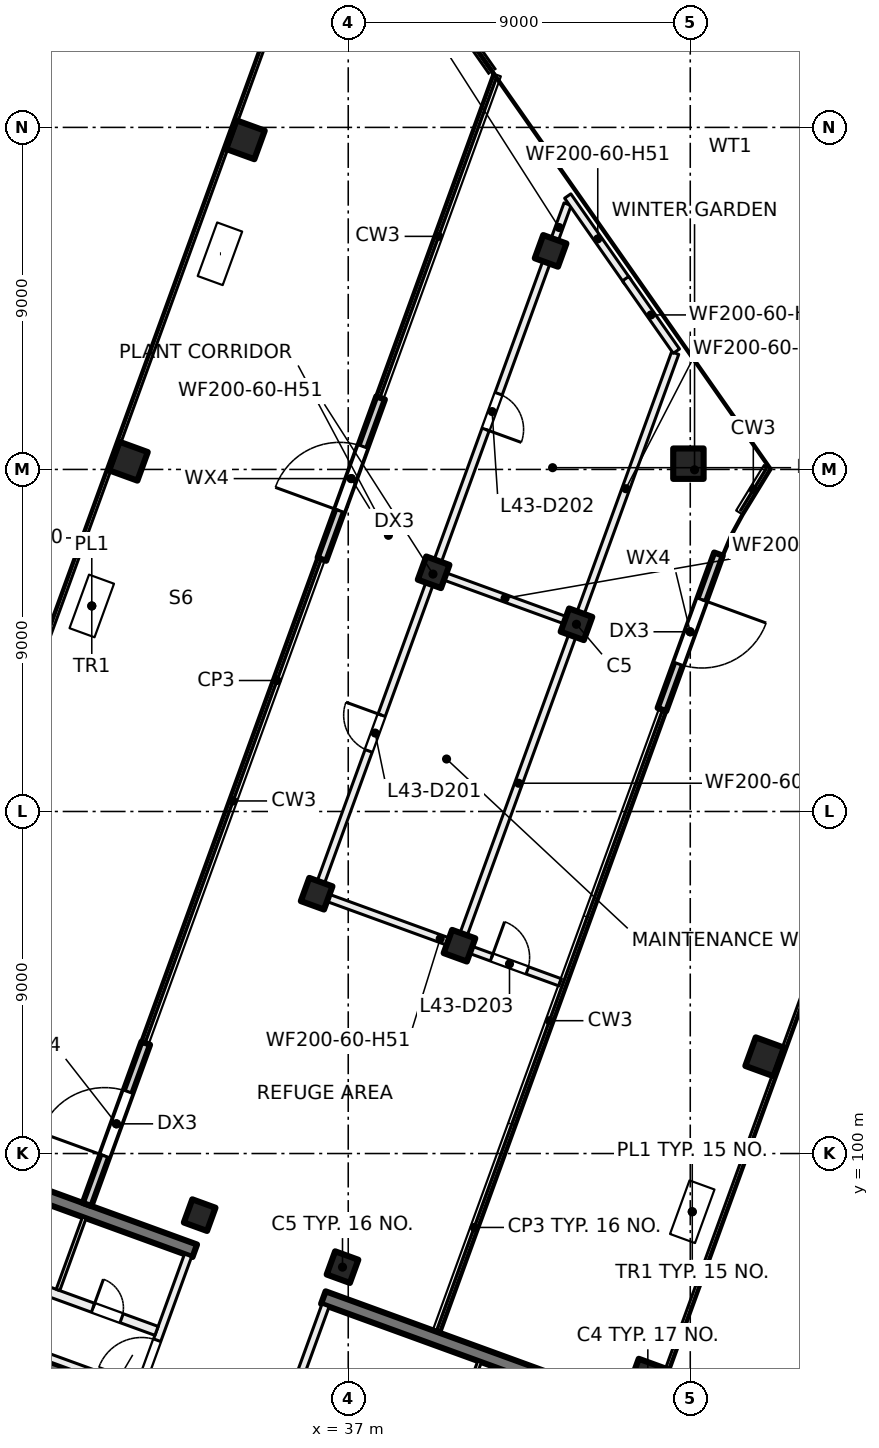
"""IFC4 building model, lengths in metres.
Left out: names, types, materials, properties, quantities, classifications, styles, units other than length and angle.
Written with IfcOpenShell. Run it as: python <this file> out.ifc"""

import sys

from ifc_helpers import new_model, si_unit, direction, frame, frame_2d, origin, origin_2d, place, context, subcontext, project, spatial, rectangle, extrude, element, fill, save


model = new_model("IFC4")
c1 = context("Model", 3, precision=1e-05, world=origin(), true_north=direction((0.0, 1.0)))
c2 = subcontext(c1, "Body", "Model", "MODEL_VIEW")
j1 = project(units=[si_unit("LENGTHUNIT", "METRE"), si_unit("PLANEANGLEUNIT", "RADIAN")], contexts=[c1])
p1 = place(None, origin())
s1 = spatial("IfcSite", under=j1, at=p1, CompositionType="ELEMENT")
p2 = place(p1, origin())
s2 = spatial("IfcBuilding", under=s1, at=p2, CompositionType="ELEMENT")
p3 = place(p2, frame((0.0, 0.0, 182.5)))
s3 = spatial("IfcBuildingStorey", under=s2, at=p3, CompositionType="ELEMENT", Elevation=182.5)
p4 = place(p3, frame((45.952, 118.152, 0.0), z_axis=(0.0, 0.0, 1.0), x_axis=(1.0, 0.0, 0.0)))
e1 = element("IfcColumn", 1, at=p4, inside=s3, PredefinedType="COLUMN", context=c2, shape_type="SweptSolid", body=[
    extrude(rectangle(XDim=0.8, YDim=0.8, at=origin_2d()), origin(), (0.0, 0.0, 1.0), 5.5),
])
for number, where, z_axis, x_axis in (
    (2, (43.006, 113.925, 0.0), (0.0, 0.0, 1.0), (-0.342, -0.94, 0.0)),
    (3, (39.927, 105.468, 0.0), (0.0, 0.0, 1.0), (-0.342, -0.94, 0.0)),
    (4, (36.849, 97.011, 0.0), (0.0, 0.0, 1.0), (-0.342, -0.94, 0.0)),
    (5, (42.325, 123.751, 0.0), (0.0, 0.0, 1.0), (-0.342, -0.94, 0.0)),
    (6, (39.247, 115.293, 0.0), (0.0, 0.0, 1.0), (-0.342, -0.94, 0.0)),
    (7, (36.169, 106.836, 0.0), (0.0, 0.0, 1.0), (-0.342, -0.94, 0.0)),
    (8, (33.091, 98.379, 0.0), (0.0, 0.0, 1.0), (-0.342, -0.94, 0.0)),
):
    element("IfcColumn", number, at=place(p3, frame(where, z_axis=z_axis, x_axis=x_axis)), inside=s3, PredefinedType="COLUMN", context=c2, shape_type="SweptSolid", body=[
        extrude(rectangle(XDim=0.65, YDim=0.65, at=origin_2d()), origin(), (0.0, 0.0, 1.0), 5.5),
    ])
for number, where, z_axis, x_axis in (
    (9, (47.962, 102.544, 0.0), (0.0, 0.0, 1.0), (-0.342, -0.94, 0.0)),
    (10, (44.884, 94.087, 0.0), (0.0, 0.0, 1.0), (-0.342, -0.94, 0.0)),
    (11, (34.291, 126.675, 0.0), (0.0, 0.0, 1.0), (-0.342, -0.94, 0.0)),
    (12, (31.212, 118.218, 0.0), (0.0, 0.0, 1.0), (-0.342, -0.94, 0.0)),
):
    element("IfcColumn", number, at=place(p3, frame(where, z_axis=z_axis, x_axis=x_axis)), inside=s3, PredefinedType="COLUMN", context=c2, shape_type="SweptSolid", body=[
        extrude(rectangle(XDim=0.8, YDim=0.8, at=origin_2d()), origin(), (0.0, 0.0, 1.0), 5.5),
    ])
p5 = place(p3, frame((31.165, 93.599, 0.0), z_axis=(0.0, 0.0, 1.0), x_axis=(-0.939683528043, 0.3420451244, 0.0)))
e13 = element("IfcWall", 13, at=p5, inside=s3, PredefinedType="SHEAR", context=c2, shape_type="SweptSolid", body=[
    extrude(rectangle(XDim=3.05, YDim=0.35, at=frame_2d((1.525, 0.0))), origin(), (0.0, 0.0, 1.0), 5.5),
])
p6 = place(p3, frame((44.473, 93.251, 0.0), z_axis=(0.0, 0.0, 1.0), x_axis=(-0.939692847377, 0.34201952077, 0.0)))
e14 = element("IfcWall", 14, at=p6, inside=s3, PredefinedType="SHEAR", context=c2, shape_type="SweptSolid", body=[
    extrude(rectangle(XDim=8.65, YDim=0.35, at=frame_2d((4.325, 0.0))), origin(), (0.0, 0.0, 1.0), 5.5),
])
p7 = place(p3, frame((32.962, 97.441, 0.0), z_axis=(0.0, 0.0, 1.0), x_axis=(-0.939689545667, 0.342028592028, 0.0)))
e15 = element("IfcWall", 15, at=p7, inside=s3, PredefinedType="SHEAR", context=c2, shape_type="SweptSolid", body=[
    extrude(rectangle(XDim=8.65, YDim=0.35, at=frame_2d((4.325, 0.0))), origin(), (0.0, 0.0, 1.0), 5.5),
])
p8 = place(p3, frame((30.128, 98.659, 0.0), z_axis=(0.0, 0.0, 1.0), x_axis=(0.342038159768, 0.939686063142, 0.0)))
e16 = element("IfcWall", 16, at=p8, inside=s3, PredefinedType="SOLIDWALL", context=c2, shape_type="SweptSolid", body=[
    extrude(rectangle(XDim=4.517, YDim=0.24, at=frame_2d((2.258, 0.0))), origin(), (0.0, 0.0, 1.0), 5.125),
])
p9 = place(p8, frame((1.358, 0.0, 0.0)))
e17 = element("IfcOpeningElement", 17, at=p9, cuts=e16, PredefinedType="OPENING", context=c2, shape_type="SweptSolid", body=[
    extrude(rectangle(XDim=1.8, YDim=2.4, at=frame_2d((0.9, 1.2))), frame((0.0, 0.13, 0.0), z_axis=(0.0, -1.0, 0.0), x_axis=(1.0, 0.0, 0.0)), (0.0, 0.0, 1.0), 0.26),
])
p10 = place(p3, frame((36.307, 115.637, 0.0), z_axis=(0.0, 0.0, 1.0), x_axis=(0.341990430397, 0.939703434875, 0.0)))
e18 = element("IfcWall", 18, at=p10, inside=s3, PredefinedType="SOLIDWALL", context=c2, shape_type="SweptSolid", body=[
    extrude(rectangle(XDim=4.517, YDim=0.24, at=frame_2d((2.258, 0.0))), origin(), (0.0, 0.0, 1.0), 5.125),
])
p11 = place(p10, frame((1.358, 0.0, 0.0)))
e19 = element("IfcOpeningElement", 19, at=p11, cuts=e18, PredefinedType="OPENING", context=c2, shape_type="SweptSolid", body=[
    extrude(rectangle(XDim=1.8, YDim=2.4, at=frame_2d((0.9, 1.2))), frame((0.0, 0.13, 0.0), z_axis=(0.0, -1.0, 0.0), x_axis=(1.0, 0.0, 0.0)), (0.0, 0.0, 1.0), 0.26),
])
p12 = place(p3, frame((46.743, 115.773, 0.0), z_axis=(0.0, 0.0, 1.0), x_axis=(-0.342004232448, -0.939698411719, 0.0)))
e20 = element("IfcWall", 20, at=p12, inside=s3, PredefinedType="SOLIDWALL", context=c2, shape_type="SweptSolid", body=[
    extrude(rectangle(XDim=4.353, YDim=0.24, at=frame_2d((2.177, 0.0))), origin(), (0.0, 0.0, 1.0), 5.125),
])
p13 = place(p12, frame((1.277, 0.0, 0.0)))
e21 = element("IfcOpeningElement", 21, at=p13, cuts=e20, PredefinedType="OPENING", context=c2, shape_type="SweptSolid", body=[
    extrude(rectangle(XDim=1.8, YDim=2.4, at=frame_2d((0.9, 1.2))), frame((0.0, 0.13, 0.0), z_axis=(0.0, -1.0, 0.0), x_axis=(1.0, 0.0, 0.0)), (0.0, 0.0, 1.0), 0.26),
])
p14 = place(p3, frame((31.459, 93.678, 0.0), z_axis=(0.0, 0.0, 1.0), x_axis=(0.341985870128, 0.939705094502, 0.0)))
e22 = element("IfcWall", 22, at=p14, inside=s3, PredefinedType="PARTITIONING", context=c2, shape_type="SweptSolid", body=[
    extrude(rectangle(XDim=3.875, YDim=0.2, at=frame_2d((1.938, 0.0))), origin(), (0.0, 0.0, 1.0), 5.125),
])
p15 = place(p14, frame((0.3, 0.0, 0.0)))
e23 = element("IfcOpeningElement", 23, at=p15, cuts=e22, PredefinedType="OPENING", context=c2, shape_type="SweptSolid", body=[
    extrude(rectangle(XDim=1.2, YDim=2.1, at=frame_2d((0.6, 1.05))), frame((0.0, 0.11, 0.0), z_axis=(0.0, -1.0, 0.0), x_axis=(1.0, 0.0, 0.0)), (0.0, 0.0, 1.0), 0.22),
])
p16 = place(p3, frame((23.483, 96.688, 0.0), z_axis=(0.0, 0.0, 1.0), x_axis=(0.939691007314, -0.342024576271, 0.0)))
e24 = element("IfcWall", 24, at=p16, inside=s3, PredefinedType="PARTITIONING", context=c2, shape_type="SweptSolid", body=[
    extrude(rectangle(XDim=8.425, YDim=0.2, at=frame_2d((4.212, 0.0))), origin(), (0.0, 0.0, 1.0), 5.125),
])
p17 = place(p16, frame((1.688, 0.0, 0.0)))
e25 = element("IfcOpeningElement", 25, at=p17, cuts=e24, PredefinedType="OPENING", context=c2, shape_type="SweptSolid", body=[
    extrude(rectangle(XDim=1.5, YDim=2.1, at=frame_2d((0.75, 1.05))), frame((0.0, 0.11, 0.0), z_axis=(0.0, -1.0, 0.0), x_axis=(1.0, 0.0, 0.0)), (0.0, 0.0, 1.0), 0.22),
])
p18 = place(p3, frame((24.039, 98.215, 0.0), z_axis=(0.0, 0.0, 1.0), x_axis=(0.939687617333, -0.342033889887, 0.0)))
e26 = element("IfcWall", 26, at=p18, inside=s3, PredefinedType="PARTITIONING", context=c2, shape_type="SweptSolid", body=[
    extrude(rectangle(XDim=8.425, YDim=0.25, at=frame_2d((4.212, 0.0))), origin(), (0.0, 0.0, 1.0), 5.125),
])
p19 = place(p18, frame((6.647, 0.0, 0.0)))
e27 = element("IfcOpeningElement", 27, at=p19, cuts=e26, PredefinedType="OPENING", context=c2, shape_type="SweptSolid", body=[
    extrude(rectangle(XDim=0.8, YDim=2.1, at=frame_2d((0.4, 1.05))), frame((0.0, 0.135, 0.0), z_axis=(0.0, -1.0, 0.0), x_axis=(1.0, 0.0, 0.0)), (0.0, 0.0, 1.0), 0.27),
])
p20 = place(p18, frame((2.385, 0.0, 0.0)))
e28 = element("IfcOpeningElement", 28, at=p20, cuts=e26, PredefinedType="OPENING", context=c2, shape_type="SweptSolid", body=[
    extrude(rectangle(XDim=0.8, YDim=2.1, at=frame_2d((0.4, 1.05))), frame((0.0, 0.135, 0.0), z_axis=(0.0, -1.0, 0.0), x_axis=(1.0, 0.0, 0.0)), (0.0, 0.0, 1.0), 0.27),
])
p21 = place(p3, frame((29.362, 96.41, 0.0), z_axis=(0.0, 0.0, 1.0), x_axis=(0.342043138314, 0.939684250976, 0.0)))
e29 = element("IfcWall", 29, at=p21, inside=s3, PredefinedType="PARTITIONING", context=c2, shape_type="SweptSolid", body=[
    extrude(rectangle(XDim=2.025, YDim=0.1, at=frame_2d((1.012, 0.0))), origin(), (0.0, 0.0, 1.0), 5.125),
])
p22 = place(p3, frame((36.403, 96.003, 0.0), z_axis=(0.0, 0.0, 1.0), x_axis=(-0.342041503764, -0.939684845947, 0.0)))
e30 = element("IfcWall", 30, at=p22, inside=s3, PredefinedType="PARTITIONING", context=c2, shape_type="SweptSolid", body=[
    extrude(rectangle(XDim=3.875, YDim=0.2, at=frame_2d((1.938, 0.0))), origin(), (0.0, 0.0, 1.0), 5.125),
])
p23 = place(p22, frame((2.375, 0.0, 0.0)))
e31 = element("IfcOpeningElement", 31, at=p23, cuts=e30, PredefinedType="OPENING", context=c2, shape_type="SweptSolid", body=[
    extrude(rectangle(XDim=1.2, YDim=2.1, at=frame_2d((0.6, 1.05))), frame((0.0, 0.11, 0.0), z_axis=(0.0, -1.0, 0.0), x_axis=(1.0, 0.0, 0.0)), (0.0, 0.0, 1.0), 0.22),
])
p24 = place(p3, frame((40.457, 94.527, 0.0), z_axis=(0.0, 0.0, 1.0), x_axis=(-0.342043138314, -0.939684250976, 0.0)))
e32 = element("IfcWall", 32, at=p24, inside=s3, PredefinedType="PARTITIONING", context=c2, shape_type="SweptSolid", body=[
    extrude(rectangle(XDim=2.025, YDim=0.1, at=frame_2d((1.012, 0.0))), origin(), (0.0, 0.0, 1.0), 5.125),
])
p25 = place(p3, frame((42.325, 123.751, 0.0), z_axis=(0.0, 0.0, 1.0), x_axis=(-0.341979144562, -0.939707542103, 0.0)))
e33 = element("IfcWall", 33, at=p25, inside=s3, PredefinedType="PARTITIONING", context=c2, shape_type="SweptSolid", body=[
    extrude(rectangle(XDim=18.1, YDim=0.2, at=frame_2d((9.05, 0.0))), origin(), (0.0, 0.0, 1.0), 5.125),
])
p26 = place(p25, frame((13.001, 0.0, 0.0)))
e34 = element("IfcOpeningElement", 34, at=p26, cuts=e33, PredefinedType="OPENING", context=c2, shape_type="SweptSolid", body=[
    extrude(rectangle(XDim=1.0, YDim=2.1, at=frame_2d((0.5, 1.05))), frame((0.0, 0.11, 0.0), z_axis=(0.0, -1.0, 0.0), x_axis=(1.0, 0.0, 0.0)), (0.0, 0.0, 1.0), 0.22),
])
p27 = place(p25, frame((4.0, 0.0, 0.0)))
e35 = element("IfcOpeningElement", 35, at=p27, cuts=e33, PredefinedType="OPENING", context=c2, shape_type="SweptSolid", body=[
    extrude(rectangle(XDim=1.0, YDim=2.1, at=frame_2d((0.5, 1.05))), frame((0.0, 0.11, 0.0), z_axis=(0.0, -1.0, 0.0), x_axis=(1.0, 0.0, 0.0)), (0.0, 0.0, 1.0), 0.22),
])
p28 = place(p3, frame((36.263, 106.802, 0.0), z_axis=(0.0, 0.0, 1.0), x_axis=(0.939692599749, -0.342020201123, 0.0)))
e36 = element("IfcWall", 36, at=p28, inside=s3, PredefinedType="PARTITIONING", context=c2, shape_type="SweptSolid", body=[
    extrude(rectangle(XDim=6.719, YDim=0.2, at=frame_2d((3.36, 0.0))), origin(), (0.0, 0.0, 1.0), 5.125),
])
p29 = place(p28, frame((4.8, 0.0, 0.0)))
e37 = element("IfcOpeningElement", 37, at=p29, cuts=e36, PredefinedType="OPENING", context=c2, shape_type="SweptSolid", body=[
    extrude(rectangle(XDim=1.0, YDim=2.1, at=frame_2d((0.5, 1.05))), frame((0.0, 0.11, 0.0), z_axis=(0.0, -1.0, 0.0), x_axis=(1.0, 0.0, 0.0)), (0.0, 0.0, 1.0), 0.22),
])
p30 = place(p3, frame((39.341, 115.259, 0.0), z_axis=(0.0, 0.0, 1.0), x_axis=(0.939667689469, -0.342088633789, 0.0)))
e38 = element("IfcWall", 38, at=p30, inside=s3, PredefinedType="PARTITIONING", context=c2, shape_type="SweptSolid", body=[
    extrude(rectangle(XDim=3.8, YDim=0.2, at=frame_2d((1.9, 0.0))), origin(), (0.0, 0.0, 1.0), 5.125),
])
p31 = place(p3, frame((39.961, 105.562, 0.0), z_axis=(0.0, 0.0, 1.0), x_axis=(0.342146086239, 0.939646771756, 0.0)))
e39 = element("IfcWall", 39, at=p31, inside=s3, PredefinedType="PARTITIONING", context=c2, shape_type="SweptSolid", body=[
    extrude(rectangle(XDim=8.9, YDim=0.2, at=frame_2d((4.45, 0.0))), origin(), (0.0, 0.0, 1.0), 5.125),
])
p32 = place(p3, frame((42.325, 123.751, 0.0), z_axis=(0.0, 0.0, 1.0), x_axis=(0.342477242407, 0.939526124402, 0.0)))
e40 = element("IfcWall", 40, at=p32, inside=s3, PredefinedType="PARTITIONING", context=c2, shape_type="SweptSolid", body=[
    extrude(rectangle(XDim=1.308, YDim=0.2, at=frame_2d((0.654, 0.0))), origin(), (0.0, 0.0, 1.0), 4.325),
])
p33 = place(p3, frame((43.006, 113.925, 0.0), z_axis=(0.0, 0.0, 1.0), x_axis=(0.341977957522, 0.939707974091, 0.0)))
e41 = element("IfcWall", 41, at=p33, inside=s3, PredefinedType="PARTITIONING", context=c2, shape_type="SweptSolid", body=[
    extrude(rectangle(XDim=7.594, YDim=0.2, at=frame_2d((3.797, 0.0))), origin(), (0.0, 0.0, 1.0), 4.325),
])
p34 = place(p3, frame((42.776, 125.194, 0.0), z_axis=(0.0, 0.0, 1.0), x_axis=(0.573492079308, -0.819211105254, 0.0)))
e42 = element("IfcWall", 42, at=p34, inside=s3, PredefinedType="PARTITIONING", context=c2, shape_type="SweptSolid", body=[
    extrude(rectangle(XDim=2.755, YDim=0.2, at=frame_2d((1.377, 0.0))), origin(), (0.0, 0.0, 1.0), 5.125),
])
p35 = place(p3, frame((44.298, 123.019, 0.0), z_axis=(0.0, 0.0, 1.0), x_axis=(0.574046148046, -0.818822947843, 0.0)))
e43 = element("IfcWall", 43, at=p35, inside=s3, PredefinedType="PARTITIONING", context=c2, shape_type="SweptSolid", body=[
    extrude(rectangle(XDim=2.329, YDim=0.2, at=frame_2d((1.165, 0.0))), origin(), (0.0, 0.0, 1.0), 5.125),
])
p36 = place(p9, origin())
e44 = element("IfcDoor", 44, at=p36, inside=s3, OperationType="DOUBLE_DOOR_SINGLE_SWING", PredefinedType="DOOR", context=c2, shape_type="SweptSolid", body=[
    extrude(rectangle(XDim=1.8, YDim=2.4, at=frame_2d((0.9, 1.2))), frame((0.0, 0.025, 0.0), z_axis=(0.0, -1.0, 0.0), x_axis=(1.0, 0.0, 0.0)), (0.0, 0.0, 1.0), 0.05),
])
fill(e17, e44)
p37 = place(p11, origin())
e45 = element("IfcDoor", 45, at=p37, inside=s3, OperationType="DOUBLE_DOOR_SINGLE_SWING", PredefinedType="DOOR", context=c2, shape_type="SweptSolid", body=[
    extrude(rectangle(XDim=1.8, YDim=2.4, at=frame_2d((0.9, 1.2))), frame((0.0, 0.025, 0.0), z_axis=(0.0, -1.0, 0.0), x_axis=(1.0, 0.0, 0.0)), (0.0, 0.0, 1.0), 0.05),
])
fill(e19, e45)
p38 = place(p13, origin())
e46 = element("IfcDoor", 46, at=p38, inside=s3, OperationType="DOUBLE_DOOR_SINGLE_SWING", PredefinedType="DOOR", context=c2, shape_type="SweptSolid", body=[
    extrude(rectangle(XDim=1.8, YDim=2.4, at=frame_2d((0.9, 1.2))), frame((0.0, 0.025, 0.0), z_axis=(0.0, -1.0, 0.0), x_axis=(1.0, 0.0, 0.0)), (0.0, 0.0, 1.0), 0.05),
])
fill(e21, e46)
p39 = place(p15, origin())
e47 = element("IfcDoor", 47, at=p39, inside=s3, OperationType="DOUBLE_DOOR_SINGLE_SWING", PredefinedType="DOOR", context=c2, shape_type="SweptSolid", body=[
    extrude(rectangle(XDim=1.2, YDim=2.1, at=frame_2d((0.6, 1.05))), frame((0.0, 0.025, 0.0), z_axis=(0.0, -1.0, 0.0), x_axis=(1.0, 0.0, 0.0)), (0.0, 0.0, 1.0), 0.05),
])
fill(e23, e47)
p40 = place(p19, origin())
e48 = element("IfcDoor", 48, at=p40, inside=s3, OperationType="SINGLE_SWING_LEFT", PredefinedType="DOOR", context=c2, shape_type="SweptSolid", body=[
    extrude(rectangle(XDim=0.8, YDim=2.1, at=frame_2d((0.4, 1.05))), frame((0.0, 0.025, 0.0), z_axis=(0.0, -1.0, 0.0), x_axis=(1.0, 0.0, 0.0)), (0.0, 0.0, 1.0), 0.05),
])
fill(e27, e48)
p41 = place(p26, origin())
e49 = element("IfcDoor", 49, at=p41, inside=s3, OperationType="SINGLE_SWING_LEFT", PredefinedType="DOOR", context=c2, shape_type="SweptSolid", body=[
    extrude(rectangle(XDim=1.0, YDim=2.1, at=frame_2d((0.5, 1.05))), frame((0.0, 0.025, 0.0), z_axis=(0.0, -1.0, 0.0), x_axis=(1.0, 0.0, 0.0)), (0.0, 0.0, 1.0), 0.05),
])
fill(e34, e49)
p42 = place(p27, origin())
e50 = element("IfcDoor", 50, at=p42, inside=s3, OperationType="SINGLE_SWING_RIGHT", PredefinedType="DOOR", context=c2, shape_type="SweptSolid", body=[
    extrude(rectangle(XDim=1.0, YDim=2.1, at=frame_2d((0.5, 1.05))), frame((0.0, 0.025, 0.0), z_axis=(0.0, -1.0, 0.0), x_axis=(1.0, 0.0, 0.0)), (0.0, 0.0, 1.0), 0.05),
])
fill(e35, e50)
p43 = place(p29, origin())
e51 = element("IfcDoor", 51, at=p43, inside=s3, OperationType="SINGLE_SWING_LEFT", PredefinedType="DOOR", context=c2, shape_type="SweptSolid", body=[
    extrude(rectangle(XDim=1.0, YDim=2.1, at=frame_2d((0.5, 1.05))), frame((0.0, 0.025, 0.0), z_axis=(0.0, -1.0, 0.0), x_axis=(1.0, 0.0, 0.0)), (0.0, 0.0, 1.0), 0.05),
])
fill(e37, e51)
save(model, sys.argv[1])
